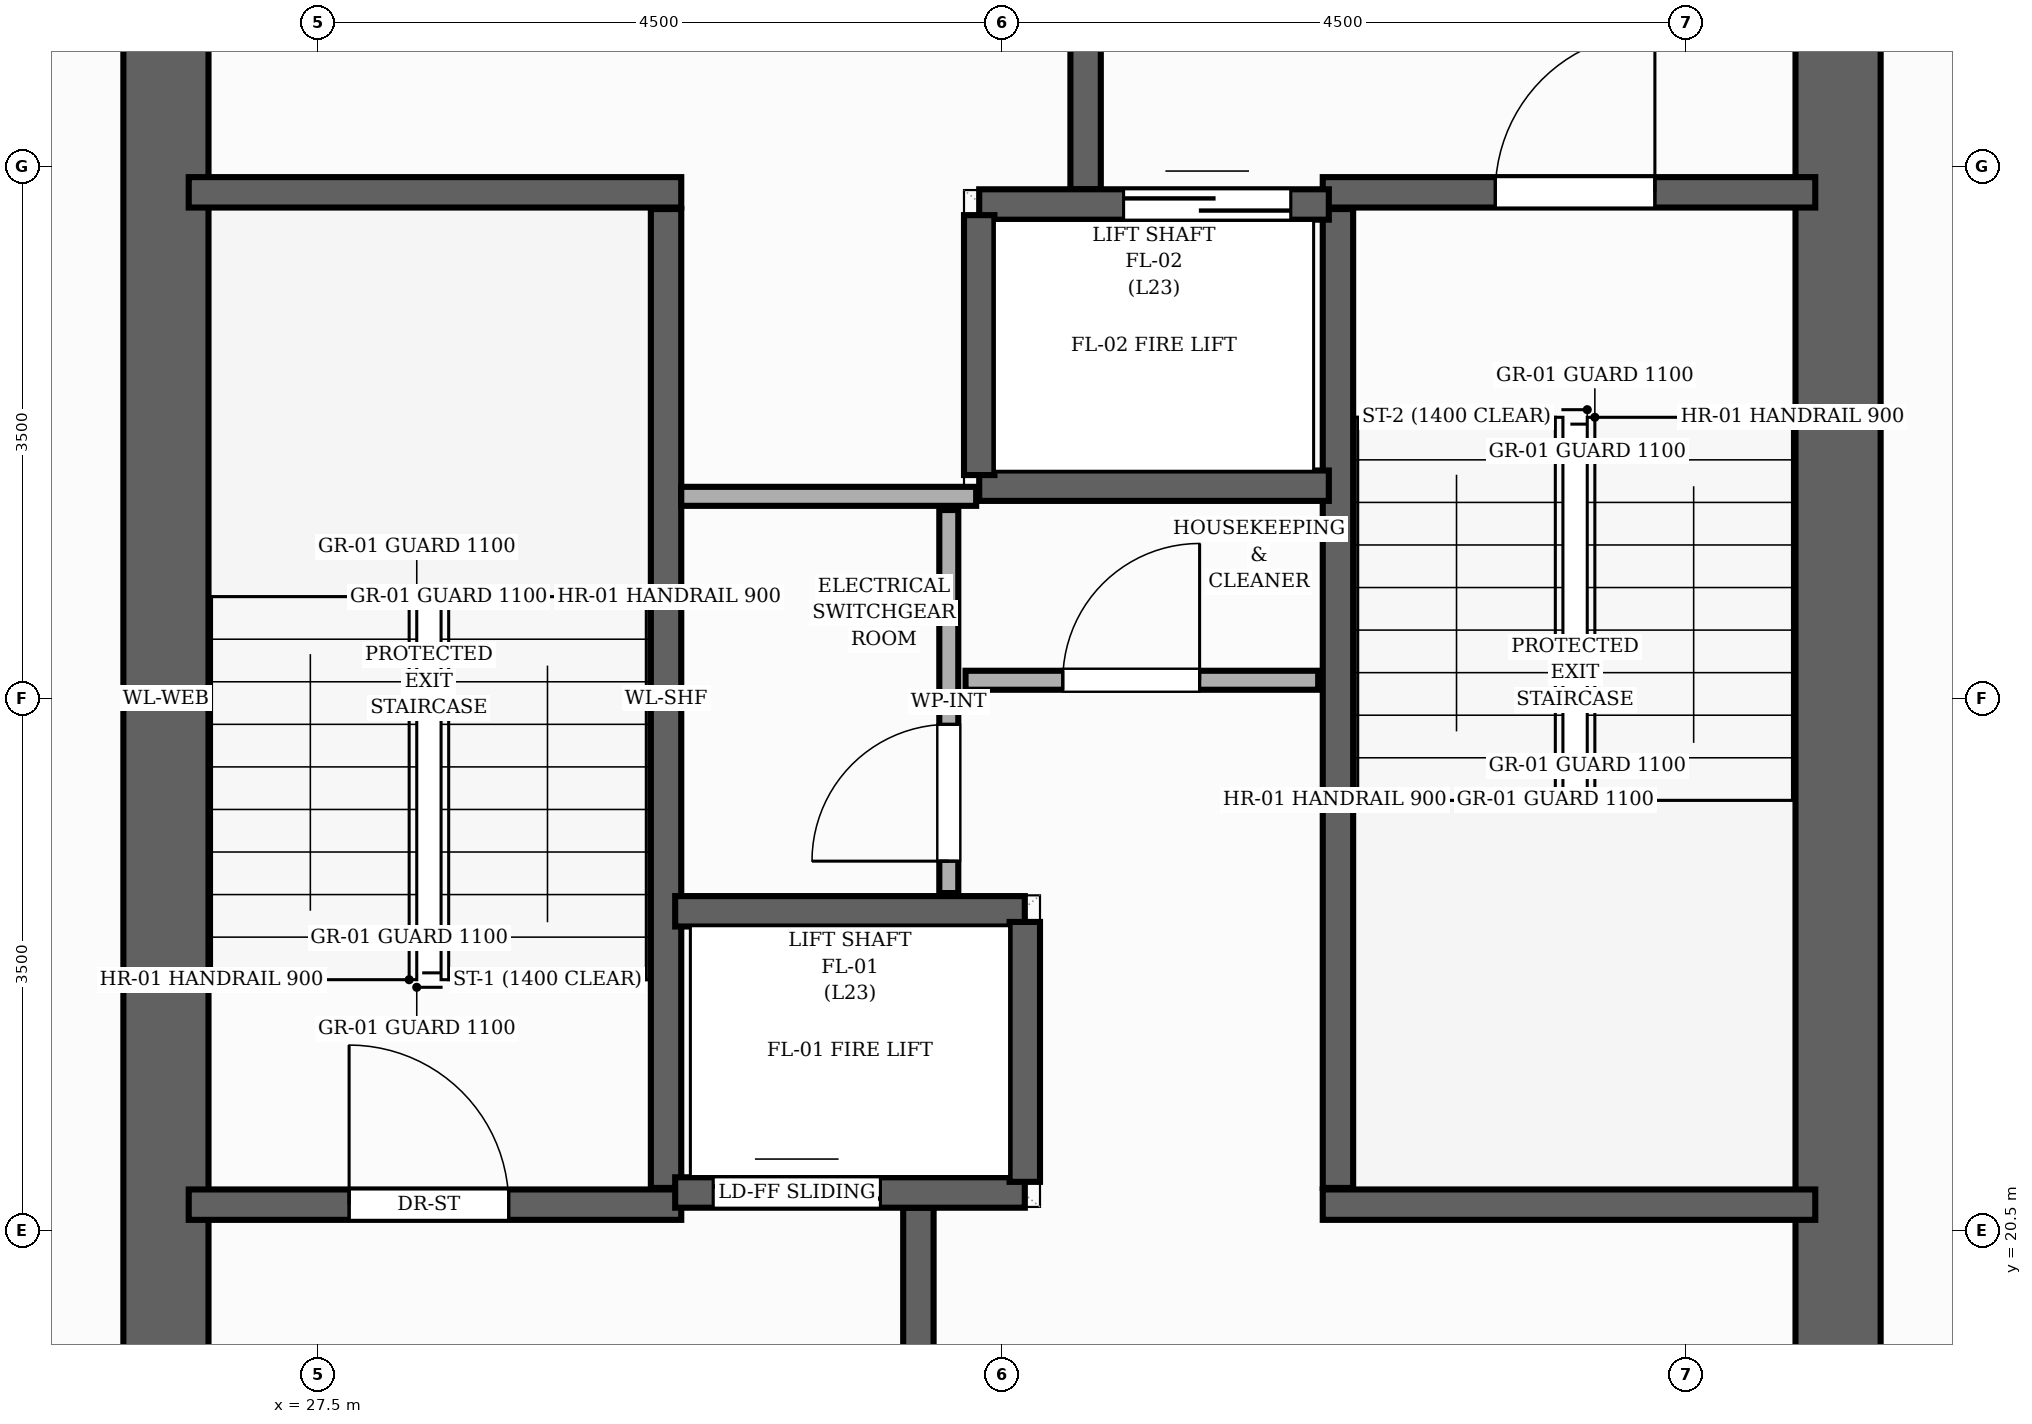
"""IFC4 building model, lengths in metres.
Left out: names, types, materials, properties, quantities, classifications, styles, units other than length and angle.
Written with IfcOpenShell. Run it as: python <this file> out.ifc"""

import sys

from ifc_helpers import new_model, si_unit, direction, frame, frame_2d, origin, place, context, subcontext, project, spatial, rectangle, extrude, element, fill, save


model = new_model("IFC4")
c1 = context("Model", 3, precision=1e-05, world=origin(), true_north=direction((0.0, 1.0)))
c2 = subcontext(c1, "Body", "Model", "MODEL_VIEW")
j1 = project(units=[si_unit("LENGTHUNIT", "METRE"), si_unit("PLANEANGLEUNIT", "RADIAN")], contexts=[c1])
p1 = place(None, origin())
s1 = spatial("IfcSite", under=j1, at=p1, CompositionType="ELEMENT")
p2 = place(p1, origin())
s2 = spatial("IfcBuilding", under=s1, at=p2, CompositionType="ELEMENT")
p3 = place(p2, frame((0.0, 0.0, 77.28)))
s3 = spatial("IfcBuildingStorey", under=s2, at=p3, CompositionType="ELEMENT", Elevation=77.28)
for number, where, z_axis, x_axis in (
    (1, (26.5, 17.35, 0.0), (0.0, 0.0, 1.0), (0.0, 1.0, 0.0)),
    (2, (37.5, 17.35, 0.0), (0.0, 0.0, 1.0), (0.0, 1.0, 0.0)),
):
    element("IfcWall", number, at=place(p3, frame(where, z_axis=z_axis, x_axis=x_axis)), inside=s3, PredefinedType="SHEAR", context=c2, shape_type="SweptSolid", body=[
        extrude(rectangle(XDim=13.3, YDim=0.56, at=frame_2d((6.65, 0.0))), origin(), (0.0, 0.0, 1.0), 3.2),
    ])
p4 = place(p3, frame((29.79, 20.78, 0.0), z_axis=(0.0, 0.0, 1.0), x_axis=(0.0, 1.0, 0.0)))
e3 = element("IfcWall", 3, at=p4, inside=s3, PredefinedType="SHEAR", context=c2, shape_type="SweptSolid", body=[
    extrude(rectangle(XDim=6.44, YDim=0.2, at=frame_2d((3.22, 0.0))), origin(), (0.0, 0.0, 1.0), 3.2),
])
p5 = place(p3, frame((26.65, 27.33, 0.0), z_axis=(0.0, 0.0, 1.0), x_axis=(1.0, 0.0, 0.0)))
e4 = element("IfcWall", 4, at=p5, inside=s3, PredefinedType="SHEAR", context=c2, shape_type="SweptSolid", body=[
    extrude(rectangle(XDim=3.24, YDim=0.2, at=frame_2d((1.62, 0.0))), origin(), (0.0, 0.0, 1.0), 3.2),
])
p6 = place(p3, frame((26.65, 20.67, 0.0), z_axis=(0.0, 0.0, 1.0), x_axis=(1.0, 0.0, 0.0)))
e5 = element("IfcWall", 5, at=p6, inside=s3, PredefinedType="SHEAR", context=c2, shape_type="SweptSolid", body=[
    extrude(rectangle(XDim=3.24, YDim=0.2, at=frame_2d((1.62, 0.0))), origin(), (0.0, 0.0, 1.0), 3.2),
])
p7 = place(p6, frame((1.055, 0.0, 0.0)))
e6 = element("IfcOpeningElement", 6, at=p7, cuts=e5, PredefinedType="OPENING", context=c2, shape_type="SweptSolid", body=[
    extrude(rectangle(XDim=1.05, YDim=2.15, at=frame_2d((0.525, 1.075))), frame((0.0, 0.11, 0.0), z_axis=(0.0, -1.0, 0.0), x_axis=(1.0, 0.0, 0.0)), (0.0, 0.0, 1.0), 0.22),
])
p8 = place(p3, frame((34.21, 20.78, 0.0), z_axis=(0.0, 0.0, 1.0), x_axis=(0.0, 1.0, 0.0)))
e7 = element("IfcWall", 7, at=p8, inside=s3, PredefinedType="SHEAR", context=c2, shape_type="SweptSolid", body=[
    extrude(rectangle(XDim=6.44, YDim=0.2, at=frame_2d((3.22, 0.0))), origin(), (0.0, 0.0, 1.0), 3.2),
])
p9 = place(p3, frame((34.11, 20.67, 0.0), z_axis=(0.0, 0.0, 1.0), x_axis=(1.0, 0.0, 0.0)))
e8 = element("IfcWall", 8, at=p9, inside=s3, PredefinedType="SHEAR", context=c2, shape_type="SweptSolid", body=[
    extrude(rectangle(XDim=3.24, YDim=0.2, at=frame_2d((1.62, 0.0))), origin(), (0.0, 0.0, 1.0), 3.2),
])
p10 = place(p3, frame((34.11, 27.33, 0.0), z_axis=(0.0, 0.0, 1.0), x_axis=(1.0, 0.0, 0.0)))
e9 = element("IfcWall", 9, at=p10, inside=s3, PredefinedType="SHEAR", context=c2, shape_type="SweptSolid", body=[
    extrude(rectangle(XDim=3.24, YDim=0.2, at=frame_2d((1.62, 0.0))), origin(), (0.0, 0.0, 1.0), 3.2),
])
p11 = place(p10, frame((1.135, 0.0, 0.0)))
e10 = element("IfcOpeningElement", 10, at=p11, cuts=e9, PredefinedType="OPENING", context=c2, shape_type="SweptSolid", body=[
    extrude(rectangle(XDim=1.05, YDim=2.15, at=frame_2d((0.525, 1.075))), frame((0.0, 0.11, 0.0), z_axis=(0.0, -1.0, 0.0), x_axis=(1.0, 0.0, 0.0)), (0.0, 0.0, 1.0), 0.22),
])
for number, where, z_axis, x_axis in (
    (11, (31.45, 17.15, 0.0), (0.0, 0.0, 1.0), (0.0, 1.0, 0.0)),
    (12, (32.55, 27.35, 0.0), (0.0, 0.0, 1.0), (0.0, 1.0, 0.0)),
):
    element("IfcWall", number, at=place(p3, frame(where, z_axis=z_axis, x_axis=x_axis)), inside=s3, PredefinedType="SHEAR", context=c2, shape_type="SweptSolid", body=[
        extrude(rectangle(XDim=3.5, YDim=0.2, at=frame_2d((1.75, 0.0))), origin(), (0.0, 0.0, 1.0), 3.2),
    ])
p12 = place(p3, frame((29.85, 20.75, 0.0), z_axis=(0.0, 0.0, 1.0), x_axis=(1.0, 0.0, 0.0)))
e13 = element("IfcWall", 13, at=p12, inside=s3, PredefinedType="SHEAR", context=c2, shape_type="SweptSolid", body=[
    extrude(rectangle(XDim=2.3, YDim=0.2, at=frame_2d((1.15, 0.0))), origin(), (0.0, 0.0, 1.0), 3.2),
])
p13 = place(p12, frame((0.25, 0.0, 0.0)))
e14 = element("IfcOpeningElement", 14, at=p13, cuts=e13, PredefinedType="OPENING", context=c2, shape_type="SweptSolid", body=[
    extrude(rectangle(XDim=1.1, YDim=2.15, at=frame_2d((0.55, 1.075))), frame((0.0, 0.11, 0.0), z_axis=(0.0, -1.0, 0.0), x_axis=(1.0, 0.0, 0.0)), (0.0, 0.0, 1.0), 0.22),
])
p14 = place(p3, frame((29.85, 22.6, 0.0), z_axis=(0.0, 0.0, 1.0), x_axis=(1.0, 0.0, 0.0)))
e15 = element("IfcWall", 15, at=p14, inside=s3, PredefinedType="SHEAR", context=c2, shape_type="SweptSolid", body=[
    extrude(rectangle(XDim=2.3, YDim=0.2, at=frame_2d((1.15, 0.0))), origin(), (0.0, 0.0, 1.0), 3.2),
])
p15 = place(p3, frame((32.15, 20.82, 0.0), z_axis=(0.0, 0.0, 1.0), x_axis=(0.0, 1.0, 0.0)))
e16 = element("IfcWall", 16, at=p15, inside=s3, PredefinedType="SHEAR", context=c2, shape_type="SweptSolid", body=[
    extrude(rectangle(XDim=1.71, YDim=0.2, at=frame_2d((0.855, 0.0))), origin(), (0.0, 0.0, 1.0), 3.2),
])
p16 = place(p3, frame((31.85, 27.25, 0.0), z_axis=(0.0, 0.0, 1.0), x_axis=(1.0, 0.0, 0.0)))
e17 = element("IfcWall", 17, at=p16, inside=s3, PredefinedType="SHEAR", context=c2, shape_type="SweptSolid", body=[
    extrude(rectangle(XDim=2.3, YDim=0.2, at=frame_2d((1.15, 0.0))), origin(), (0.0, 0.0, 1.0), 3.2),
])
p17 = place(p16, frame((0.95, 0.0, 0.0)))
e18 = element("IfcOpeningElement", 18, at=p17, cuts=e17, PredefinedType="OPENING", context=c2, shape_type="SweptSolid", body=[
    extrude(rectangle(XDim=1.1, YDim=2.15, at=frame_2d((0.55, 1.075))), frame((0.0, 0.11, 0.0), z_axis=(0.0, -1.0, 0.0), x_axis=(1.0, 0.0, 0.0)), (0.0, 0.0, 1.0), 0.22),
])
p18 = place(p3, frame((31.85, 25.4, 0.0), z_axis=(0.0, 0.0, 1.0), x_axis=(1.0, 0.0, 0.0)))
e19 = element("IfcWall", 19, at=p18, inside=s3, PredefinedType="SHEAR", context=c2, shape_type="SweptSolid", body=[
    extrude(rectangle(XDim=2.3, YDim=0.2, at=frame_2d((1.15, 0.0))), origin(), (0.0, 0.0, 1.0), 3.2),
])
p19 = place(p3, frame((31.85, 25.47, 0.0), z_axis=(0.0, 0.0, 1.0), x_axis=(0.0, 1.0, 0.0)))
e20 = element("IfcWall", 20, at=p19, inside=s3, PredefinedType="SHEAR", context=c2, shape_type="SweptSolid", body=[
    extrude(rectangle(XDim=1.71, YDim=0.2, at=frame_2d((0.855, 0.0))), origin(), (0.0, 0.0, 1.0), 3.2),
])
p20 = place(p3, frame((31.65, 22.72, 0.0), z_axis=(0.0, 0.0, 1.0), x_axis=(0.0, 1.0, 0.0)))
e21 = element("IfcWall", 21, at=p20, inside=s3, PredefinedType="PARTITIONING", context=c2, shape_type="SweptSolid", body=[
    extrude(rectangle(XDim=2.52, YDim=0.125, at=frame_2d((1.26, 0.0))), origin(), (0.0, 0.0, 1.0), 2.955),
])
p21 = place(p20, frame((0.21, 0.0, 0.0)))
e22 = element("IfcOpeningElement", 22, at=p21, cuts=e21, PredefinedType="OPENING", context=c2, shape_type="SweptSolid", body=[
    extrude(rectangle(XDim=0.9, YDim=2.1, at=frame_2d((0.45, 1.05))), frame((0.0, 0.073, 0.0), z_axis=(0.0, -1.0, 0.0), x_axis=(1.0, 0.0, 0.0)), (0.0, 0.0, 1.0), 0.145),
])
p22 = place(p3, frame((31.76, 24.12, 0.0), z_axis=(0.0, 0.0, 1.0), x_axis=(1.0, 0.0, 0.0)))
e23 = element("IfcWall", 23, at=p22, inside=s3, PredefinedType="PARTITIONING", context=c2, shape_type="SweptSolid", body=[
    extrude(rectangle(XDim=2.32, YDim=0.125, at=frame_2d((1.16, 0.0))), origin(), (0.0, 0.0, 1.0), 2.955),
])
p23 = place(p22, frame((0.64, 0.0, 0.0)))
e24 = element("IfcOpeningElement", 24, at=p23, cuts=e23, PredefinedType="OPENING", context=c2, shape_type="SweptSolid", body=[
    extrude(rectangle(XDim=0.9, YDim=2.1, at=frame_2d((0.45, 1.05))), frame((0.0, 0.073, 0.0), z_axis=(0.0, -1.0, 0.0), x_axis=(1.0, 0.0, 0.0)), (0.0, 0.0, 1.0), 0.145),
])
p24 = place(p3, frame((29.89, 25.33, 0.0), z_axis=(0.0, 0.0, 1.0), x_axis=(1.0, 0.0, 0.0)))
e25 = element("IfcWall", 25, at=p24, inside=s3, PredefinedType="PARTITIONING", context=c2, shape_type="SweptSolid", body=[
    extrude(rectangle(XDim=1.94, YDim=0.125, at=frame_2d((0.97, 0.0))), origin(), (0.0, 0.0, 1.0), 2.955),
])
p25 = place(p7, origin())
e26 = element("IfcDoor", 26, at=p25, inside=s3, OperationType="SINGLE_SWING_LEFT", PredefinedType="DOOR", context=c2, shape_type="SweptSolid", body=[
    extrude(rectangle(XDim=1.05, YDim=2.15, at=frame_2d((0.525, 1.075))), frame((0.0, 0.025, 0.0), z_axis=(0.0, -1.0, 0.0), x_axis=(1.0, 0.0, 0.0)), (0.0, 0.0, 1.0), 0.05),
])
fill(e6, e26)
p26 = place(p11, origin())
e27 = element("IfcDoor", 27, at=p26, inside=s3, OperationType="SINGLE_SWING_RIGHT", PredefinedType="DOOR", context=c2, shape_type="SweptSolid", body=[
    extrude(rectangle(XDim=1.05, YDim=2.15, at=frame_2d((0.525, 1.075))), frame((0.0, 0.025, 0.0), z_axis=(0.0, -1.0, 0.0), x_axis=(1.0, 0.0, 0.0)), (0.0, 0.0, 1.0), 0.05),
])
fill(e10, e27)
p27 = place(p13, origin())
e28 = element("IfcDoor", 28, at=p27, inside=s3, OperationType="DOUBLE_DOOR_SLIDING", PredefinedType="DOOR", context=c2, shape_type="SweptSolid", body=[
    extrude(rectangle(XDim=1.1, YDim=2.15, at=frame_2d((0.55, 1.075))), frame((0.0, 0.025, 0.0), z_axis=(0.0, -1.0, 0.0), x_axis=(1.0, 0.0, 0.0)), (0.0, 0.0, 1.0), 0.05),
])
fill(e14, e28)
p28 = place(p17, origin())
e29 = element("IfcDoor", 29, at=p28, inside=s3, OperationType="DOUBLE_DOOR_SLIDING", PredefinedType="DOOR", context=c2, shape_type="SweptSolid", body=[
    extrude(rectangle(XDim=1.1, YDim=2.15, at=frame_2d((0.55, 1.075))), frame((0.0, 0.025, 0.0), z_axis=(0.0, -1.0, 0.0), x_axis=(1.0, 0.0, 0.0)), (0.0, 0.0, 1.0), 0.05),
])
fill(e18, e29)
p29 = place(p21, origin())
e30 = element("IfcDoor", 30, at=p29, inside=s3, OperationType="SINGLE_SWING_LEFT", PredefinedType="DOOR", context=c2, shape_type="SweptSolid", body=[
    extrude(rectangle(XDim=0.9, YDim=2.1, at=frame_2d((0.45, 1.05))), frame((0.0, 0.025, 0.0), z_axis=(0.0, -1.0, 0.0), x_axis=(1.0, 0.0, 0.0)), (0.0, 0.0, 1.0), 0.05),
])
fill(e22, e30)
p30 = place(p23, origin())
e31 = element("IfcDoor", 31, at=p30, inside=s3, OperationType="SINGLE_SWING_RIGHT", PredefinedType="DOOR", context=c2, shape_type="SweptSolid", body=[
    extrude(rectangle(XDim=0.9, YDim=2.1, at=frame_2d((0.45, 1.05))), frame((0.0, 0.025, 0.0), z_axis=(0.0, -1.0, 0.0), x_axis=(1.0, 0.0, 0.0)), (0.0, 0.0, 1.0), 0.05),
])
fill(e24, e31)
save(model, sys.argv[1])
